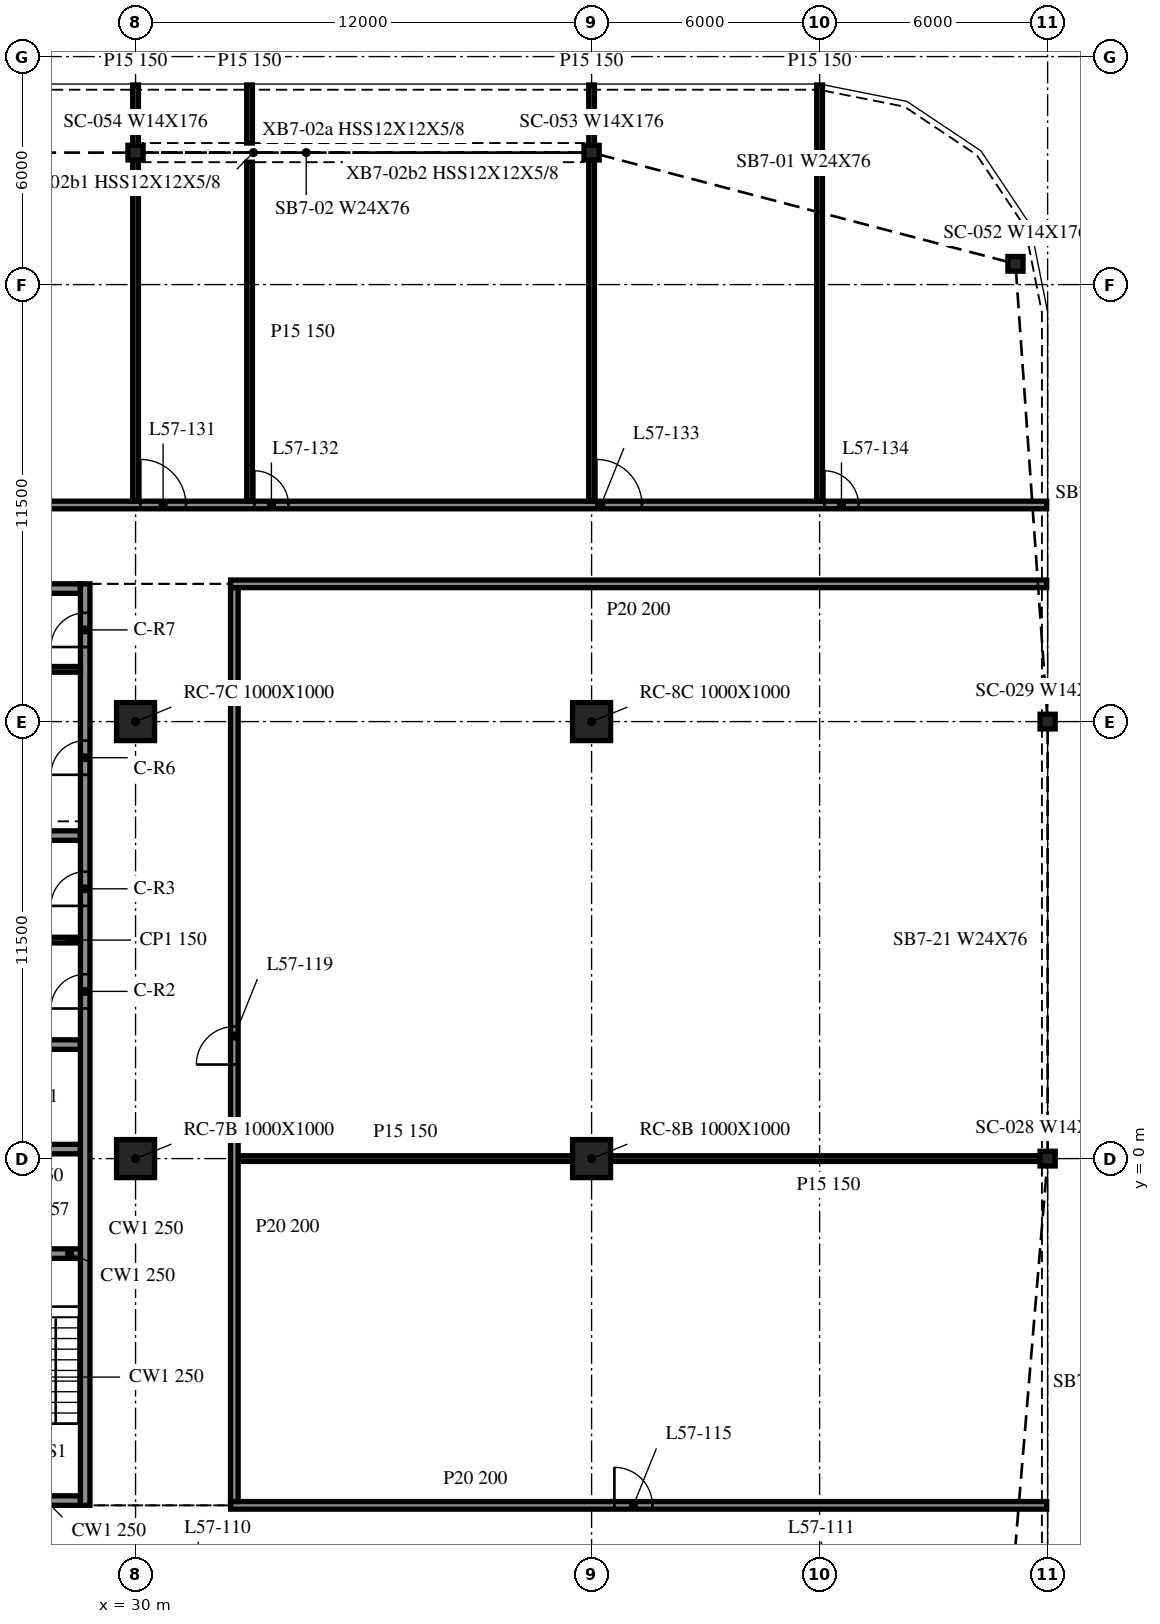
"""IFC4 building model, lengths in metres.
Left out: names, types, materials, properties, quantities, classifications, styles, units other than length and angle.
Written with IfcOpenShell. Run it as: python <this file> out.ifc"""

import sys

from ifc_helpers import new_model, si_unit, direction, frame, frame_2d, origin, origin_2d, place, context, subcontext, project, spatial, rectangle, i_section, extrude, element, fill, save


model = new_model("IFC4")
c1 = context("Model", 3, precision=1e-05, world=origin(), true_north=direction((0.0, 1.0)))
c2 = subcontext(c1, "Body", "Model", "MODEL_VIEW")
j1 = project(units=[si_unit("LENGTHUNIT", "METRE"), si_unit("PLANEANGLEUNIT", "RADIAN")], contexts=[c1])
p1 = place(None, origin())
s1 = spatial("IfcSite", under=j1, at=p1, CompositionType="ELEMENT")
p2 = place(p1, origin())
s2 = spatial("IfcBuilding", under=s1, at=p2, CompositionType="ELEMENT")
p3 = place(p2, frame((0.0, 0.0, 236.2)))
s3 = spatial("IfcBuildingStorey", under=s2, at=p3, CompositionType="ELEMENT", Elevation=236.2)
for number, where, z_axis, x_axis in (
    (1, (30.0, 0.0, -0.34), (0.0, 0.0, 1.0), (1.0, 0.0, 0.0)),
    (2, (30.0, 11.5, -0.34), (0.0, 0.0, 1.0), (1.0, 0.0, 0.0)),
    (3, (42.0, 0.0, -0.34), (0.0, 0.0, 1.0), (1.0, 0.0, 0.0)),
    (4, (42.0, 11.5, -0.34), (0.0, 0.0, 1.0), (1.0, 0.0, 0.0)),
):
    element("IfcColumn", number, at=place(p3, frame(where, z_axis=z_axis, x_axis=x_axis)), inside=s3, PredefinedType="COLUMN", context=c2, shape_type="SweptSolid", body=[
        extrude(rectangle(XDim=1.0, YDim=1.0, at=origin_2d()), origin(), (0.0, 0.0, 1.0), 3.8),
    ])
for number, where, z_axis, x_axis in (
    (5, (53.154, 23.546, -0.34), (0.0, 0.0, 1.0), (1.0, 0.0, 0.0)),
    (6, (42.0, 26.473, -0.34), (0.0, 0.0, 1.0), (1.0, 0.0, 0.0)),
    (7, (30.0, 26.473, -0.34), (0.0, 0.0, 1.0), (1.0, 0.0, 0.0)),
    (8, (54.0, 0.0, -0.34), (0.0, 0.0, 1.0), (1.0, 0.0, 0.0)),
    (9, (54.0, 11.5, -0.34), (0.0, 0.0, 1.0), (1.0, 0.0, 0.0)),
):
    element("IfcColumn", number, at=place(p3, frame(where, z_axis=z_axis, x_axis=x_axis)), inside=s3, PredefinedType="COLUMN", context=c2, shape_type="SweptSolid", body=[
        extrude(i_section(OverallWidth=0.399, OverallDepth=0.386, WebThickness=0.021, FlangeThickness=0.033, at=origin_2d()), origin(), (0.0, 0.0, 1.0), 3.8),
    ])
p4 = place(p3, frame((28.675, -9.125, 0.0), z_axis=(0.0, 0.0, 1.0), x_axis=(0.0, 1.0, 0.0)))
e10 = element("IfcWall", 10, at=p4, inside=s3, PredefinedType="SOLIDWALL", context=c2, shape_type="SweptSolid", body=[
    extrude(rectangle(XDim=24.25, YDim=0.25, at=frame_2d((12.125, 0.0))), origin(), (0.0, 0.0, 1.0), 3.46),
])
p5 = place(p4, frame((13.075, 0.0, 0.0)))
e11 = element("IfcOpeningElement", 11, at=p5, cuts=e10, PredefinedType="OPENING", context=c2, shape_type="SweptSolid", body=[
    extrude(rectangle(XDim=0.9, YDim=2.1, at=frame_2d((0.45, 1.05))), frame((0.0, 0.135, 0.0), z_axis=(0.0, -1.0, 0.0), x_axis=(1.0, 0.0, 0.0)), (0.0, 0.0, 1.0), 0.27),
])
p6 = place(p4, frame((15.775, 0.0, 0.0)))
e12 = element("IfcOpeningElement", 12, at=p6, cuts=e10, PredefinedType="OPENING", context=c2, shape_type="SweptSolid", body=[
    extrude(rectangle(XDim=0.9, YDim=2.1, at=frame_2d((0.45, 1.05))), frame((0.0, 0.135, 0.0), z_axis=(0.0, -1.0, 0.0), x_axis=(1.0, 0.0, 0.0)), (0.0, 0.0, 1.0), 0.27),
])
p7 = place(p4, frame((19.225, 0.0, 0.0)))
e13 = element("IfcOpeningElement", 13, at=p7, cuts=e10, PredefinedType="OPENING", context=c2, shape_type="SweptSolid", body=[
    extrude(rectangle(XDim=0.9, YDim=2.1, at=frame_2d((0.45, 1.05))), frame((0.0, 0.135, 0.0), z_axis=(0.0, -1.0, 0.0), x_axis=(1.0, 0.0, 0.0)), (0.0, 0.0, 1.0), 0.27),
])
p8 = place(p4, frame((22.587, 0.0, 0.0)))
e14 = element("IfcOpeningElement", 14, at=p8, cuts=e10, PredefinedType="OPENING", context=c2, shape_type="SweptSolid", body=[
    extrude(rectangle(XDim=0.9, YDim=2.1, at=frame_2d((0.45, 1.05))), frame((0.0, 0.135, 0.0), z_axis=(0.0, -1.0, 0.0), x_axis=(1.0, 0.0, 0.0)), (0.0, 0.0, 1.0), 0.27),
])
p9 = place(p3, frame((28.55, -9.0, 0.0), z_axis=(0.0, 0.0, 1.0), x_axis=(-1.0, 0.0, 0.0)))
e15 = element("IfcWall", 15, at=p9, inside=s3, PredefinedType="SOLIDWALL", context=c2, shape_type="SweptSolid", body=[
    extrude(rectangle(XDim=9.1, YDim=0.25, at=frame_2d((4.55, 0.0))), origin(), (0.0, 0.0, 1.0), 3.46),
])
p10 = place(p9, frame((3.65, 0.0, 0.0)))
e16 = element("IfcOpeningElement", 16, at=p10, cuts=e15, PredefinedType="OPENING", context=c2, shape_type="SweptSolid", body=[
    extrude(rectangle(XDim=1.8, YDim=2.1, at=frame_2d((0.9, 1.05))), frame((0.0, 0.135, 0.0), z_axis=(0.0, -1.0, 0.0), x_axis=(1.0, 0.0, 0.0)), (0.0, 0.0, 1.0), 0.27),
])
p11 = place(p3, frame((19.45, 15.0, 0.0), z_axis=(0.0, 0.0, 1.0), x_axis=(1.0, 0.0, 0.0)))
e17 = element("IfcWall", 17, at=p11, inside=s3, PredefinedType="SOLIDWALL", context=c2, shape_type="SweptSolid", body=[
    extrude(rectangle(XDim=9.1, YDim=0.25, at=frame_2d((4.55, 0.0))), origin(), (0.0, 0.0, 1.0), 3.46),
])
p12 = place(p11, frame((3.65, 0.0, 0.0)))
e18 = element("IfcOpeningElement", 18, at=p12, cuts=e17, PredefinedType="OPENING", context=c2, shape_type="SweptSolid", body=[
    extrude(rectangle(XDim=1.8, YDim=2.1, at=frame_2d((0.9, 1.05))), frame((0.0, 0.135, 0.0), z_axis=(0.0, -1.0, 0.0), x_axis=(1.0, 0.0, 0.0)), (0.0, 0.0, 1.0), 0.27),
])
for number, where, z_axis, x_axis in (
    (19, (25.7, -2.5, 0.0), (0.0, 0.0, 1.0), (1.0, 0.0, 0.0)),
    (20, (25.7, 0.25, 0.0), (0.0, 0.0, 1.0), (1.0, 0.0, 0.0)),
    (21, (25.7, 3.0, 0.0), (0.0, 0.0, 1.0), (1.0, 0.0, 0.0)),
    (22, (25.7, 8.5, 0.0), (0.0, 0.0, 1.0), (1.0, 0.0, 0.0)),
):
    element("IfcWall", number, at=place(p3, frame(where, z_axis=z_axis, x_axis=x_axis)), inside=s3, PredefinedType="SOLIDWALL", context=c2, shape_type="SweptSolid", body=[
        extrude(rectangle(XDim=2.85, YDim=0.25, at=frame_2d((1.425, 0.0))), origin(), (0.0, 0.0, 1.0), 3.46),
    ])
for number, where, z_axis, x_axis in (
    (23, (25.7, 5.75, 0.0), (0.0, 0.0, 1.0), (1.0, 0.0, 0.0)),
    (24, (25.7, 12.875, 0.0), (0.0, 0.0, 1.0), (1.0, 0.0, 0.0)),
):
    element("IfcWall", number, at=place(p3, frame(where, z_axis=z_axis, x_axis=x_axis)), inside=s3, PredefinedType="PARTITIONING", context=c2, shape_type="SweptSolid", body=[
        extrude(rectangle(XDim=2.85, YDim=0.15, at=frame_2d((1.425, 0.0))), origin(), (0.0, 0.0, 1.0), 3.46),
    ])
p13 = place(p3, frame((32.5, -9.125, 0.0), z_axis=(0.0, 0.0, 1.0), x_axis=(1.0, 0.0, 0.0)))
e25 = element("IfcWall", 25, at=p13, inside=s3, PredefinedType="PARTITIONING", context=c2, shape_type="SweptSolid", body=[
    extrude(rectangle(XDim=21.475, YDim=0.2, at=frame_2d((10.738, 0.0))), origin(), (0.0, 0.0, 1.0), 3.46),
])
p14 = place(p13, frame((10.1, 0.0, 0.0)))
e26 = element("IfcOpeningElement", 26, at=p14, cuts=e25, PredefinedType="OPENING", context=c2, shape_type="SweptSolid", body=[
    extrude(rectangle(XDim=1.0, YDim=2.1, at=frame_2d((0.5, 1.05))), frame((0.0, 0.11, 0.0), z_axis=(0.0, -1.0, 0.0), x_axis=(1.0, 0.0, 0.0)), (0.0, 0.0, 1.0), 0.22),
])
p15 = place(p3, frame((32.7, 0.0, 0.0), z_axis=(0.0, 0.0, 1.0), x_axis=(1.0, 0.0, 0.0)))
e27 = element("IfcWall", 27, at=p15, inside=s3, PredefinedType="PARTITIONING", context=c2, shape_type="SweptSolid", body=[
    extrude(rectangle(XDim=8.8, YDim=0.15, at=frame_2d((4.4, 0.0))), origin(), (0.0, 0.0, 1.0), 3.46),
])
p16 = place(p3, frame((42.5, 0.0, 0.0), z_axis=(0.0, 0.0, 1.0), x_axis=(1.0, 0.0, 0.0)))
e28 = element("IfcWall", 28, at=p16, inside=s3, PredefinedType="PARTITIONING", context=c2, shape_type="SweptSolid", body=[
    extrude(rectangle(XDim=11.475, YDim=0.15, at=frame_2d((5.738, 0.0))), origin(), (0.0, 0.0, 1.0), 3.46),
])
p17 = place(p3, frame((32.5, 15.125, 0.0), z_axis=(0.0, 0.0, 1.0), x_axis=(1.0, 0.0, 0.0)))
e29 = element("IfcWall", 29, at=p17, inside=s3, PredefinedType="PARTITIONING", context=c2, shape_type="SweptSolid", body=[
    extrude(rectangle(XDim=21.475, YDim=0.2, at=frame_2d((10.738, 0.0))), origin(), (0.0, 0.0, 1.0), 3.46),
])
p18 = place(p3, frame((-41.975, 17.2, 0.0), z_axis=(0.0, 0.0, 1.0), x_axis=(1.0, 0.0, 0.0)))
e30 = element("IfcWall", 30, at=p18, inside=s3, PredefinedType="PARTITIONING", context=c2, shape_type="SweptSolid", body=[
    extrude(rectangle(XDim=95.95, YDim=0.2, at=frame_2d((47.975, 0.0))), origin(), (0.0, 0.0, 1.0), 3.46),
])
p19 = place(p18, frame((10.7, 0.0, 0.0)))
e31 = element("IfcOpeningElement", 31, at=p19, cuts=e30, PredefinedType="OPENING", context=c2, shape_type="SweptSolid", body=[
    extrude(rectangle(XDim=0.9, YDim=2.1, at=frame_2d((0.45, 1.05))), frame((0.0, 0.11, 0.0), z_axis=(0.0, -1.0, 0.0), x_axis=(1.0, 0.0, 0.0)), (0.0, 0.0, 1.0), 0.22),
])
p20 = place(p18, frame((13.3, 0.0, 0.0)))
e32 = element("IfcOpeningElement", 32, at=p20, cuts=e30, PredefinedType="OPENING", context=c2, shape_type="SweptSolid", body=[
    extrude(rectangle(XDim=1.2, YDim=2.1, at=frame_2d((0.6, 1.05))), frame((0.0, 0.11, 0.0), z_axis=(0.0, -1.0, 0.0), x_axis=(1.0, 0.0, 0.0)), (0.0, 0.0, 1.0), 0.22),
])
p21 = place(p18, frame((22.7, 0.0, 0.0)))
e33 = element("IfcOpeningElement", 33, at=p21, cuts=e30, PredefinedType="OPENING", context=c2, shape_type="SweptSolid", body=[
    extrude(rectangle(XDim=0.9, YDim=2.1, at=frame_2d((0.45, 1.05))), frame((0.0, 0.11, 0.0), z_axis=(0.0, -1.0, 0.0), x_axis=(1.0, 0.0, 0.0)), (0.0, 0.0, 1.0), 0.22),
])
p22 = place(p18, frame((28.3, 0.0, 0.0)))
e34 = element("IfcOpeningElement", 34, at=p22, cuts=e30, PredefinedType="OPENING", context=c2, shape_type="SweptSolid", body=[
    extrude(rectangle(XDim=1.2, YDim=2.1, at=frame_2d((0.6, 1.05))), frame((0.0, 0.11, 0.0), z_axis=(0.0, -1.0, 0.0), x_axis=(1.0, 0.0, 0.0)), (0.0, 0.0, 1.0), 0.22),
])
p23 = place(p18, frame((40.3, 0.0, 0.0)))
e35 = element("IfcOpeningElement", 35, at=p23, cuts=e30, PredefinedType="OPENING", context=c2, shape_type="SweptSolid", body=[
    extrude(rectangle(XDim=1.2, YDim=2.1, at=frame_2d((0.6, 1.05))), frame((0.0, 0.11, 0.0), z_axis=(0.0, -1.0, 0.0), x_axis=(1.0, 0.0, 0.0)), (0.0, 0.0, 1.0), 0.22),
])
p24 = place(p18, frame((43.7, 0.0, 0.0)))
e36 = element("IfcOpeningElement", 36, at=p24, cuts=e30, PredefinedType="OPENING", context=c2, shape_type="SweptSolid", body=[
    extrude(rectangle(XDim=0.9, YDim=2.1, at=frame_2d((0.45, 1.05))), frame((0.0, 0.11, 0.0), z_axis=(0.0, -1.0, 0.0), x_axis=(1.0, 0.0, 0.0)), (0.0, 0.0, 1.0), 0.22),
])
p25 = place(p18, frame((47.3, 0.0, 0.0)))
e37 = element("IfcOpeningElement", 37, at=p25, cuts=e30, PredefinedType="OPENING", context=c2, shape_type="SweptSolid", body=[
    extrude(rectangle(XDim=1.2, YDim=2.1, at=frame_2d((0.6, 1.05))), frame((0.0, 0.11, 0.0), z_axis=(0.0, -1.0, 0.0), x_axis=(1.0, 0.0, 0.0)), (0.0, 0.0, 1.0), 0.22),
])
p26 = place(p18, frame((54.1, 0.0, 0.0)))
e38 = element("IfcOpeningElement", 38, at=p26, cuts=e30, PredefinedType="OPENING", context=c2, shape_type="SweptSolid", body=[
    extrude(rectangle(XDim=0.9, YDim=2.1, at=frame_2d((0.45, 1.05))), frame((0.0, 0.11, 0.0), z_axis=(0.0, -1.0, 0.0), x_axis=(1.0, 0.0, 0.0)), (0.0, 0.0, 1.0), 0.22),
])
p27 = place(p18, frame((60.1, 0.0, 0.0)))
e39 = element("IfcOpeningElement", 39, at=p27, cuts=e30, PredefinedType="OPENING", context=c2, shape_type="SweptSolid", body=[
    extrude(rectangle(XDim=1.2, YDim=2.1, at=frame_2d((0.6, 1.05))), frame((0.0, 0.11, 0.0), z_axis=(0.0, -1.0, 0.0), x_axis=(1.0, 0.0, 0.0)), (0.0, 0.0, 1.0), 0.22),
])
p28 = place(p18, frame((72.1, 0.0, 0.0)))
e40 = element("IfcOpeningElement", 40, at=p28, cuts=e30, PredefinedType="OPENING", context=c2, shape_type="SweptSolid", body=[
    extrude(rectangle(XDim=1.2, YDim=2.1, at=frame_2d((0.6, 1.05))), frame((0.0, 0.11, 0.0), z_axis=(0.0, -1.0, 0.0), x_axis=(1.0, 0.0, 0.0)), (0.0, 0.0, 1.0), 0.22),
])
p29 = place(p18, frame((75.1, 0.0, 0.0)))
e41 = element("IfcOpeningElement", 41, at=p29, cuts=e30, PredefinedType="OPENING", context=c2, shape_type="SweptSolid", body=[
    extrude(rectangle(XDim=0.9, YDim=2.1, at=frame_2d((0.45, 1.05))), frame((0.0, 0.11, 0.0), z_axis=(0.0, -1.0, 0.0), x_axis=(1.0, 0.0, 0.0)), (0.0, 0.0, 1.0), 0.22),
])
p30 = place(p18, frame((84.1, 0.0, 0.0)))
e42 = element("IfcOpeningElement", 42, at=p30, cuts=e30, PredefinedType="OPENING", context=c2, shape_type="SweptSolid", body=[
    extrude(rectangle(XDim=1.2, YDim=2.1, at=frame_2d((0.6, 1.05))), frame((0.0, 0.11, 0.0), z_axis=(0.0, -1.0, 0.0), x_axis=(1.0, 0.0, 0.0)), (0.0, 0.0, 1.0), 0.22),
])
p31 = place(p18, frame((90.1, 0.0, 0.0)))
e43 = element("IfcOpeningElement", 43, at=p31, cuts=e30, PredefinedType="OPENING", context=c2, shape_type="SweptSolid", body=[
    extrude(rectangle(XDim=0.9, YDim=2.1, at=frame_2d((0.45, 1.05))), frame((0.0, 0.11, 0.0), z_axis=(0.0, -1.0, 0.0), x_axis=(1.0, 0.0, 0.0)), (0.0, 0.0, 1.0), 0.22),
])
p32 = place(p3, frame((30.0, 17.3, 0.0), z_axis=(0.0, 0.0, 1.0), x_axis=(0.0, 1.0, 0.0)))
e44 = element("IfcWall", 44, at=p32, inside=s3, PredefinedType="PARTITIONING", context=c2, shape_type="SweptSolid", body=[
    extrude(rectangle(XDim=10.953, YDim=0.15, at=frame_2d((5.477, 0.0))), origin(), (0.0, 0.0, 1.0), 3.46),
])
p33 = place(p3, frame((32.6, -9.025, 0.0), z_axis=(0.0, 0.0, 1.0), x_axis=(0.0, 1.0, 0.0)))
e45 = element("IfcWall", 45, at=p33, inside=s3, PredefinedType="PARTITIONING", context=c2, shape_type="SweptSolid", body=[
    extrude(rectangle(XDim=24.05, YDim=0.2, at=frame_2d((12.025, 0.0))), origin(), (0.0, 0.0, 1.0), 3.46),
])
p34 = place(p33, frame((11.5, 0.0, 0.0)))
e46 = element("IfcOpeningElement", 46, at=p34, cuts=e45, PredefinedType="OPENING", context=c2, shape_type="SweptSolid", body=[
    extrude(rectangle(XDim=1.0, YDim=2.1, at=frame_2d((0.5, 1.05))), frame((0.0, 0.11, 0.0), z_axis=(0.0, -1.0, 0.0), x_axis=(1.0, 0.0, 0.0)), (0.0, 0.0, 1.0), 0.22),
])
p35 = place(p3, frame((33.0, 17.3, 0.0), z_axis=(0.0, 0.0, 1.0), x_axis=(0.0, 1.0, 0.0)))
e47 = element("IfcWall", 47, at=p35, inside=s3, PredefinedType="PARTITIONING", context=c2, shape_type="SweptSolid", body=[
    extrude(rectangle(XDim=8.921, YDim=0.15, at=frame_2d((4.46, 0.0))), origin(), (0.0, 0.0, 1.0), 3.46),
])
p36 = place(p3, frame((33.0, 26.725, 0.0), z_axis=(0.0, 0.0, 1.0), x_axis=(0.0, 1.0, 0.0)))
e48 = element("IfcWall", 48, at=p36, inside=s3, PredefinedType="PARTITIONING", context=c2, shape_type="SweptSolid", body=[
    extrude(rectangle(XDim=1.528, YDim=0.15, at=frame_2d((0.764, 0.0))), origin(), (0.0, 0.0, 1.0), 3.46),
])
for number, where, z_axis, x_axis in (
    (49, (42.0, 17.3, 0.0), (0.0, 0.0, 1.0), (0.0, 1.0, 0.0)),
    (50, (48.0, 17.3, 0.0), (0.0, 0.0, 1.0), (0.0, 1.0, 0.0)),
):
    element("IfcWall", number, at=place(p3, frame(where, z_axis=z_axis, x_axis=x_axis)), inside=s3, PredefinedType="PARTITIONING", context=c2, shape_type="SweptSolid", body=[
        extrude(rectangle(XDim=10.953, YDim=0.15, at=frame_2d((5.477, 0.0))), origin(), (0.0, 0.0, 1.0), 3.46),
    ])
p37 = place(p5, origin())
e51 = element("IfcDoor", 51, at=p37, inside=s3, OperationType="SINGLE_SWING_RIGHT", PredefinedType="DOOR", context=c2, shape_type="SweptSolid", body=[
    extrude(rectangle(XDim=0.9, YDim=2.1, at=frame_2d((0.45, 1.05))), frame((0.0, 0.025, 0.0), z_axis=(0.0, -1.0, 0.0), x_axis=(1.0, 0.0, 0.0)), (0.0, 0.0, 1.0), 0.05),
])
fill(e11, e51)
p38 = place(p6, origin())
e52 = element("IfcDoor", 52, at=p38, inside=s3, OperationType="SINGLE_SWING_LEFT", PredefinedType="DOOR", context=c2, shape_type="SweptSolid", body=[
    extrude(rectangle(XDim=0.9, YDim=2.1, at=frame_2d((0.45, 1.05))), frame((0.0, 0.025, 0.0), z_axis=(0.0, -1.0, 0.0), x_axis=(1.0, 0.0, 0.0)), (0.0, 0.0, 1.0), 0.05),
])
fill(e12, e52)
p39 = place(p7, origin())
e53 = element("IfcDoor", 53, at=p39, inside=s3, OperationType="SINGLE_SWING_RIGHT", PredefinedType="DOOR", context=c2, shape_type="SweptSolid", body=[
    extrude(rectangle(XDim=0.9, YDim=2.1, at=frame_2d((0.45, 1.05))), frame((0.0, 0.025, 0.0), z_axis=(0.0, -1.0, 0.0), x_axis=(1.0, 0.0, 0.0)), (0.0, 0.0, 1.0), 0.05),
])
fill(e13, e53)
p40 = place(p8, origin())
e54 = element("IfcDoor", 54, at=p40, inside=s3, OperationType="SINGLE_SWING_LEFT", PredefinedType="DOOR", context=c2, shape_type="SweptSolid", body=[
    extrude(rectangle(XDim=0.9, YDim=2.1, at=frame_2d((0.45, 1.05))), frame((0.0, 0.025, 0.0), z_axis=(0.0, -1.0, 0.0), x_axis=(1.0, 0.0, 0.0)), (0.0, 0.0, 1.0), 0.05),
])
fill(e14, e54)
p41 = place(p14, origin())
e55 = element("IfcDoor", 55, at=p41, inside=s3, OperationType="SINGLE_SWING_LEFT", PredefinedType="DOOR", context=c2, shape_type="SweptSolid", body=[
    extrude(rectangle(XDim=1.0, YDim=2.1, at=frame_2d((0.5, 1.05))), frame((0.0, 0.025, 0.0), z_axis=(0.0, -1.0, 0.0), x_axis=(1.0, 0.0, 0.0)), (0.0, 0.0, 1.0), 0.05),
])
fill(e26, e55)
p42 = place(p34, origin())
e56 = element("IfcDoor", 56, at=p42, inside=s3, OperationType="SINGLE_SWING_RIGHT", PredefinedType="DOOR", context=c2, shape_type="SweptSolid", body=[
    extrude(rectangle(XDim=1.0, YDim=2.1, at=frame_2d((0.5, 1.05))), frame((0.0, 0.025, 0.0), z_axis=(0.0, -1.0, 0.0), x_axis=(1.0, 0.0, 0.0)), (0.0, 0.0, 1.0), 0.05),
])
fill(e46, e56)
p43 = place(p28, origin())
e57 = element("IfcDoor", 57, at=p43, inside=s3, OperationType="SINGLE_SWING_RIGHT", PredefinedType="DOOR", context=c2, shape_type="SweptSolid", body=[
    extrude(rectangle(XDim=1.2, YDim=2.1, at=frame_2d((0.6, 1.05))), frame((0.0, 0.025, 0.0), z_axis=(0.0, -1.0, 0.0), x_axis=(1.0, 0.0, 0.0)), (0.0, 0.0, 1.0), 0.05),
])
fill(e40, e57)
p44 = place(p29, origin())
e58 = element("IfcDoor", 58, at=p44, inside=s3, OperationType="SINGLE_SWING_RIGHT", PredefinedType="DOOR", context=c2, shape_type="SweptSolid", body=[
    extrude(rectangle(XDim=0.9, YDim=2.1, at=frame_2d((0.45, 1.05))), frame((0.0, 0.025, 0.0), z_axis=(0.0, -1.0, 0.0), x_axis=(1.0, 0.0, 0.0)), (0.0, 0.0, 1.0), 0.05),
])
fill(e41, e58)
p45 = place(p30, origin())
e59 = element("IfcDoor", 59, at=p45, inside=s3, OperationType="SINGLE_SWING_RIGHT", PredefinedType="DOOR", context=c2, shape_type="SweptSolid", body=[
    extrude(rectangle(XDim=1.2, YDim=2.1, at=frame_2d((0.6, 1.05))), frame((0.0, 0.025, 0.0), z_axis=(0.0, -1.0, 0.0), x_axis=(1.0, 0.0, 0.0)), (0.0, 0.0, 1.0), 0.05),
])
fill(e42, e59)
p46 = place(p31, origin())
e60 = element("IfcDoor", 60, at=p46, inside=s3, OperationType="SINGLE_SWING_RIGHT", PredefinedType="DOOR", context=c2, shape_type="SweptSolid", body=[
    extrude(rectangle(XDim=0.9, YDim=2.1, at=frame_2d((0.45, 1.05))), frame((0.0, 0.025, 0.0), z_axis=(0.0, -1.0, 0.0), x_axis=(1.0, 0.0, 0.0)), (0.0, 0.0, 1.0), 0.05),
])
fill(e43, e60)
save(model, sys.argv[1])
